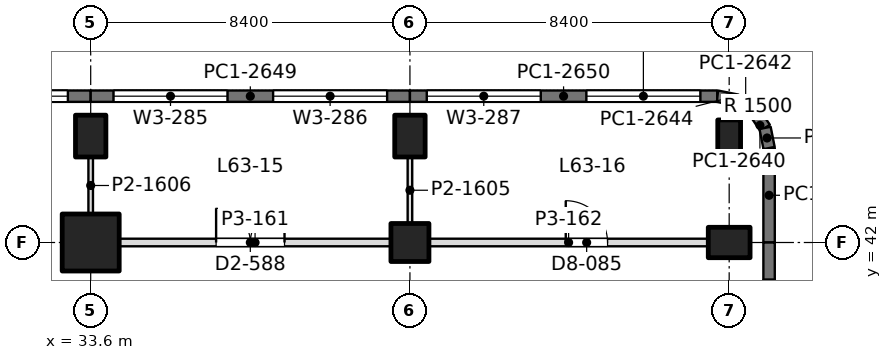
"""IFC4 building model, lengths in metres.
Left out: names, types, materials, properties, quantities, classifications, styles, units other than length and angle.
Written with IfcOpenShell. Run it as: python <this file> out.ifc"""

import sys

from ifc_helpers import new_model, si_unit, direction, frame, frame_2d, origin, origin_2d, place, context, subcontext, project, spatial, rectangle, extrude, element, fill, save


model = new_model("IFC4")
c1 = context("Model", 3, precision=1e-05, world=origin(), true_north=direction((0.0, 1.0)))
c2 = subcontext(c1, "Body", "Model", "MODEL_VIEW")
j1 = project(units=[si_unit("LENGTHUNIT", "METRE"), si_unit("PLANEANGLEUNIT", "RADIAN")], contexts=[c1])
p1 = place(None, origin())
s1 = spatial("IfcSite", under=j1, at=p1, CompositionType="ELEMENT")
p2 = place(p1, origin())
s2 = spatial("IfcBuilding", under=s1, at=p2, CompositionType="ELEMENT")
p3 = place(p2, frame((0.0, 0.0, 277.2)))
s3 = spatial("IfcBuildingStorey", under=s2, at=p3, CompositionType="ELEMENT", Elevation=277.2)
p4 = place(p3, frame((33.6, 42.0, 0.0), z_axis=(0.0, 0.0, 1.0), x_axis=(1.0, 0.0, 0.0)))
e1 = element("IfcColumn", 1, at=p4, inside=s3, PredefinedType="COLUMN", context=c2, shape_type="SweptSolid", body=[
    extrude(rectangle(XDim=1.5, YDim=1.5, at=origin_2d()), origin(), (0.0, 0.0, 1.0), 4.5),
])
p5 = place(p3, frame((33.6, 44.8, 0.0), z_axis=(0.0, 0.0, 1.0), x_axis=(1.0, 0.0, 0.0)))
e2 = element("IfcColumn", 2, at=p5, inside=s3, PredefinedType="COLUMN", context=c2, shape_type="SweptSolid", body=[
    extrude(rectangle(XDim=0.8, YDim=1.1, at=origin_2d()), origin(), (0.0, 0.0, 1.0), 4.5),
])
p6 = place(p3, frame((42.0, 42.0, 0.0), z_axis=(0.0, 0.0, 1.0), x_axis=(1.0, 0.0, 0.0)))
e3 = element("IfcColumn", 3, at=p6, inside=s3, PredefinedType="COLUMN", context=c2, shape_type="SweptSolid", body=[
    extrude(rectangle(XDim=1.0, YDim=1.0, at=origin_2d()), origin(), (0.0, 0.0, 1.0), 4.5),
])
for number, where, z_axis, x_axis in (
    (4, (42.0, 44.8, 0.0), (0.0, 0.0, 1.0), (1.0, 0.0, 0.0)),
    (5, (50.4, 42.0, 0.0), (0.0, 0.0, 1.0), (0.0, 1.0, 0.0)),
):
    element("IfcColumn", number, at=place(p3, frame(where, z_axis=z_axis, x_axis=x_axis)), inside=s3, PredefinedType="COLUMN", context=c2, shape_type="SweptSolid", body=[
        extrude(rectangle(XDim=0.8, YDim=1.1, at=origin_2d()), origin(), (0.0, 0.0, 1.0), 4.5),
    ])
p7 = place(p3, frame((50.4, 44.8, 0.0), z_axis=(0.0, 0.0, 1.0), x_axis=(1.0, 0.0, 0.0)))
e6 = element("IfcColumn", 6, at=p7, inside=s3, PredefinedType="COLUMN", context=c2, shape_type="SweptSolid", body=[
    extrude(rectangle(XDim=0.6, YDim=0.85, at=origin_2d()), origin(), (0.0, 0.0, 1.0), 4.5),
])
p8 = place(p3, frame((25.2, 45.85, 0.0), z_axis=(0.0, 0.0, 1.0), x_axis=(1.0, 0.0, 0.0)))
e7 = element("IfcWall", 7, at=p8, inside=s3, PredefinedType="SOLIDWALL", context=c2, shape_type="SweptSolid", body=[
    extrude(rectangle(XDim=8.4, YDim=0.3, at=frame_2d((4.2, 0.0))), origin(), (0.0, 0.0, 1.0), 4.3),
])
p9 = place(p8, frame((0.6, 0.0, 0.9)))
e8 = element("IfcOpeningElement", 8, at=p9, cuts=e7, PredefinedType="OPENING", context=c2, shape_type="SweptSolid", body=[
    extrude(rectangle(XDim=3.0, YDim=2.4, at=frame_2d((1.5, 1.2))), frame((0.0, 0.16, 0.0), z_axis=(0.0, -1.0, 0.0), x_axis=(1.0, 0.0, 0.0)), (0.0, 0.0, 1.0), 0.32),
])
p10 = place(p8, frame((4.8, 0.0, 0.9)))
e9 = element("IfcOpeningElement", 9, at=p10, cuts=e7, PredefinedType="OPENING", context=c2, shape_type="SweptSolid", body=[
    extrude(rectangle(XDim=3.0, YDim=2.4, at=frame_2d((1.5, 1.2))), frame((0.0, 0.16, 0.0), z_axis=(0.0, -1.0, 0.0), x_axis=(1.0, 0.0, 0.0)), (0.0, 0.0, 1.0), 0.32),
])
p11 = place(p3, frame((33.6, 45.85, 0.0), z_axis=(0.0, 0.0, 1.0), x_axis=(1.0, 0.0, 0.0)))
e10 = element("IfcWall", 10, at=p11, inside=s3, PredefinedType="SOLIDWALL", context=c2, shape_type="SweptSolid", body=[
    extrude(rectangle(XDim=8.4, YDim=0.3, at=frame_2d((4.2, 0.0))), origin(), (0.0, 0.0, 1.0), 4.3),
])
p12 = place(p11, frame((0.6, 0.0, 0.9)))
e11 = element("IfcOpeningElement", 11, at=p12, cuts=e10, PredefinedType="OPENING", context=c2, shape_type="SweptSolid", body=[
    extrude(rectangle(XDim=3.0, YDim=2.4, at=frame_2d((1.5, 1.2))), frame((0.0, 0.16, 0.0), z_axis=(0.0, -1.0, 0.0), x_axis=(1.0, 0.0, 0.0)), (0.0, 0.0, 1.0), 0.32),
])
p13 = place(p11, frame((4.8, 0.0, 0.9)))
e12 = element("IfcOpeningElement", 12, at=p13, cuts=e10, PredefinedType="OPENING", context=c2, shape_type="SweptSolid", body=[
    extrude(rectangle(XDim=3.0, YDim=2.4, at=frame_2d((1.5, 1.2))), frame((0.0, 0.16, 0.0), z_axis=(0.0, -1.0, 0.0), x_axis=(1.0, 0.0, 0.0)), (0.0, 0.0, 1.0), 0.32),
])
p14 = place(p3, frame((42.0, 45.85, 0.0), z_axis=(0.0, 0.0, 1.0), x_axis=(1.0, 0.0, 0.0)))
e13 = element("IfcWall", 13, at=p14, inside=s3, PredefinedType="SOLIDWALL", context=c2, shape_type="SweptSolid", body=[
    extrude(rectangle(XDim=8.085, YDim=0.3, at=frame_2d((4.042, 0.0))), origin(), (0.0, 0.0, 1.0), 4.3),
])
p15 = place(p14, frame((0.443, 0.0, 0.9)))
e14 = element("IfcOpeningElement", 14, at=p15, cuts=e13, PredefinedType="OPENING", context=c2, shape_type="SweptSolid", body=[
    extrude(rectangle(XDim=3.0, YDim=2.4, at=frame_2d((1.5, 1.2))), frame((0.0, 0.16, 0.0), z_axis=(0.0, -1.0, 0.0), x_axis=(1.0, 0.0, 0.0)), (0.0, 0.0, 1.0), 0.32),
])
p16 = place(p14, frame((4.643, 0.0, 0.9)))
e15 = element("IfcOpeningElement", 15, at=p16, cuts=e13, PredefinedType="OPENING", context=c2, shape_type="SweptSolid", body=[
    extrude(rectangle(XDim=3.0, YDim=2.4, at=frame_2d((1.5, 1.2))), frame((0.0, 0.16, 0.0), z_axis=(0.0, -1.0, 0.0), x_axis=(1.0, 0.0, 0.0)), (0.0, 0.0, 1.0), 0.32),
])
p17 = place(p3, frame((50.085, 45.85, 0.0), z_axis=(0.0, 0.0, 1.0), x_axis=(0.980702050465, -0.1955082817, 0.0)))
e16 = element("IfcWall", 16, at=p17, inside=s3, PredefinedType="SOLIDWALL", context=c2, shape_type="SweptSolid", body=[
    extrude(rectangle(XDim=0.541, YDim=0.3, at=frame_2d((0.271, 0.0))), origin(), (0.0, 0.0, 1.0), 4.3),
])
p18 = place(p3, frame((50.615, 45.744, 0.0), z_axis=(0.0, 0.0, 1.0), x_axis=(0.831692711774, -0.555236195849, 0.0)))
e17 = element("IfcWall", 17, at=p18, inside=s3, PredefinedType="SOLIDWALL", context=c2, shape_type="SweptSolid", body=[
    extrude(rectangle(XDim=0.525, YDim=0.3, at=frame_2d((0.263, 0.0))), origin(), (0.0, 0.0, 1.0), 4.3),
])
p19 = place(p3, frame((51.052, 45.453, 0.0), z_axis=(0.0, 0.0, 1.0), x_axis=(0.55534295404, -0.831621430339, 0.0)))
e18 = element("IfcWall", 18, at=p19, inside=s3, PredefinedType="SOLIDWALL", context=c2, shape_type="SweptSolid", body=[
    extrude(rectangle(XDim=0.526, YDim=0.3, at=frame_2d((0.263, 0.0))), origin(), (0.0, 0.0, 1.0), 4.3),
])
p20 = place(p3, frame((51.344, 45.015, 0.0), z_axis=(0.0, 0.0, 1.0), x_axis=(0.195073962632, -0.980788534345, 0.0)))
e19 = element("IfcWall", 19, at=p20, inside=s3, PredefinedType="SOLIDWALL", context=c2, shape_type="SweptSolid", body=[
    extrude(rectangle(XDim=0.541, YDim=0.3, at=frame_2d((0.271, 0.0))), origin(), (0.0, 0.0, 1.0), 4.3),
])
p21 = place(p3, frame((51.45, 44.485, 0.0), z_axis=(0.0, 0.0, 1.0), x_axis=(0.0, -1.0, 0.0)))
e20 = element("IfcWall", 20, at=p21, inside=s3, PredefinedType="SOLIDWALL", context=c2, shape_type="SweptSolid", body=[
    extrude(rectangle(XDim=2.485, YDim=0.3, at=frame_2d((1.243, 0.0))), origin(), (0.0, 0.0, 1.0), 4.3),
])
p22 = place(p3, frame((51.45, 42.0, 0.0), z_axis=(0.0, 0.0, 1.0), x_axis=(0.0, -1.0, 0.0)))
e21 = element("IfcWall", 21, at=p22, inside=s3, PredefinedType="SOLIDWALL", context=c2, shape_type="SweptSolid", body=[
    extrude(rectangle(XDim=4.35, YDim=0.3, at=frame_2d((2.175, 0.0))), origin(), (0.0, 0.0, 1.0), 4.3),
])
p23 = place(p22, frame((0.975, 0.0, 0.9)))
e22 = element("IfcOpeningElement", 22, at=p23, cuts=e21, PredefinedType="OPENING", context=c2, shape_type="SweptSolid", body=[
    extrude(rectangle(XDim=2.4, YDim=1.9, at=frame_2d((1.2, 0.95))), frame((0.0, 0.16, 0.0), z_axis=(0.0, -1.0, 0.0), x_axis=(1.0, 0.0, 0.0)), (0.0, 0.0, 1.0), 0.32),
])
p24 = place(p3, frame((34.349, 42.0, 0.0), z_axis=(0.0, 0.0, 1.0), x_axis=(1.0, 0.0, 0.0)))
e23 = element("IfcWall", 23, at=p24, inside=s3, PredefinedType="PARTITIONING", context=c2, shape_type="SweptSolid", body=[
    extrude(rectangle(XDim=7.152, YDim=0.2, at=frame_2d((3.576, 0.0))), origin(), (0.0, 0.0, 1.0), 3.292),
])
p25 = place(p24, frame((2.551, 0.0, 0.0)))
e24 = element("IfcOpeningElement", 24, at=p25, cuts=e23, PredefinedType="OPENING", context=c2, shape_type="SweptSolid", body=[
    extrude(rectangle(XDim=1.8, YDim=2.2, at=frame_2d((0.9, 1.1))), frame((0.0, 0.11, 0.0), z_axis=(0.0, -1.0, 0.0), x_axis=(1.0, 0.0, 0.0)), (0.0, 0.0, 1.0), 0.22),
])
p26 = place(p3, frame((42.499, 42.0, 0.0), z_axis=(0.0, 0.0, 1.0), x_axis=(1.0, 0.0, 0.0)))
e25 = element("IfcWall", 25, at=p26, inside=s3, PredefinedType="PARTITIONING", context=c2, shape_type="SweptSolid", body=[
    extrude(rectangle(XDim=7.352, YDim=0.2, at=frame_2d((3.676, 0.0))), origin(), (0.0, 0.0, 1.0), 3.292),
])
p27 = place(p26, frame((3.601, 0.0, 0.0)))
e26 = element("IfcOpeningElement", 26, at=p27, cuts=e25, PredefinedType="OPENING", context=c2, shape_type="SweptSolid", body=[
    extrude(rectangle(XDim=1.1, YDim=2.4, at=frame_2d((0.55, 1.2))), frame((0.0, 0.11, 0.0), z_axis=(0.0, -1.0, 0.0), x_axis=(1.0, 0.0, 0.0)), (0.0, 0.0, 1.0), 0.22),
])
p28 = place(p3, frame((33.6, 42.749, 0.0), z_axis=(0.0, 0.0, 1.0), x_axis=(0.0, 1.0, 0.0)))
e27 = element("IfcWall", 27, at=p28, inside=s3, PredefinedType="PARTITIONING", context=c2, shape_type="SweptSolid", body=[
    extrude(rectangle(XDim=1.502, YDim=0.12, at=frame_2d((0.751, 0.0))), origin(), (0.0, 0.0, 1.0), 3.292),
])
p29 = place(p3, frame((42.0, 42.499, 0.0), z_axis=(0.0, 0.0, 1.0), x_axis=(0.0, 1.0, 0.0)))
e28 = element("IfcWall", 28, at=p29, inside=s3, PredefinedType="PARTITIONING", context=c2, shape_type="SweptSolid", body=[
    extrude(rectangle(XDim=1.752, YDim=0.12, at=frame_2d((0.876, 0.0))), origin(), (0.0, 0.0, 1.0), 3.292),
])
p30 = place(p10, origin())
e29 = element("IfcWindow", 29, at=p30, inside=s3, PartitioningType="SINGLE_PANEL", PredefinedType="WINDOW", context=c2, shape_type="SweptSolid", body=[
    extrude(rectangle(XDim=3.0, YDim=2.4, at=frame_2d((1.5, 1.2))), frame((0.0, 0.03, 0.0), z_axis=(0.0, -1.0, 0.0), x_axis=(1.0, 0.0, 0.0)), (0.0, 0.0, 1.0), 0.06),
])
fill(e9, e29)
p31 = place(p12, origin())
e30 = element("IfcWindow", 30, at=p31, inside=s3, PartitioningType="SINGLE_PANEL", PredefinedType="WINDOW", context=c2, shape_type="SweptSolid", body=[
    extrude(rectangle(XDim=3.0, YDim=2.4, at=frame_2d((1.5, 1.2))), frame((0.0, 0.03, 0.0), z_axis=(0.0, -1.0, 0.0), x_axis=(1.0, 0.0, 0.0)), (0.0, 0.0, 1.0), 0.06),
])
fill(e11, e30)
p32 = place(p13, origin())
e31 = element("IfcWindow", 31, at=p32, inside=s3, PartitioningType="SINGLE_PANEL", PredefinedType="WINDOW", context=c2, shape_type="SweptSolid", body=[
    extrude(rectangle(XDim=3.0, YDim=2.4, at=frame_2d((1.5, 1.2))), frame((0.0, 0.03, 0.0), z_axis=(0.0, -1.0, 0.0), x_axis=(1.0, 0.0, 0.0)), (0.0, 0.0, 1.0), 0.06),
])
fill(e12, e31)
p33 = place(p15, origin())
e32 = element("IfcWindow", 32, at=p33, inside=s3, PartitioningType="SINGLE_PANEL", PredefinedType="WINDOW", context=c2, shape_type="SweptSolid", body=[
    extrude(rectangle(XDim=3.0, YDim=2.4, at=frame_2d((1.5, 1.2))), frame((0.0, 0.03, 0.0), z_axis=(0.0, -1.0, 0.0), x_axis=(1.0, 0.0, 0.0)), (0.0, 0.0, 1.0), 0.06),
])
fill(e14, e32)
p34 = place(p16, origin())
e33 = element("IfcWindow", 33, at=p34, inside=s3, PartitioningType="SINGLE_PANEL", PredefinedType="WINDOW", context=c2, shape_type="SweptSolid", body=[
    extrude(rectangle(XDim=3.0, YDim=2.4, at=frame_2d((1.5, 1.2))), frame((0.0, 0.03, 0.0), z_axis=(0.0, -1.0, 0.0), x_axis=(1.0, 0.0, 0.0)), (0.0, 0.0, 1.0), 0.06),
])
fill(e15, e33)
p35 = place(p23, origin())
e34 = element("IfcWindow", 34, at=p35, inside=s3, PartitioningType="SINGLE_PANEL", PredefinedType="WINDOW", context=c2, shape_type="SweptSolid", body=[
    extrude(rectangle(XDim=2.4, YDim=1.9, at=frame_2d((1.2, 0.95))), frame((0.0, 0.03, 0.0), z_axis=(0.0, -1.0, 0.0), x_axis=(1.0, 0.0, 0.0)), (0.0, 0.0, 1.0), 0.06),
])
fill(e22, e34)
p36 = place(p25, origin())
e35 = element("IfcDoor", 35, at=p36, inside=s3, OperationType="DOUBLE_DOOR_SINGLE_SWING", PredefinedType="DOOR", context=c2, shape_type="SweptSolid", body=[
    extrude(rectangle(XDim=1.8, YDim=2.2, at=frame_2d((0.9, 1.1))), frame((0.0, 0.025, 0.0), z_axis=(0.0, -1.0, 0.0), x_axis=(1.0, 0.0, 0.0)), (0.0, 0.0, 1.0), 0.05),
])
fill(e24, e35)
p37 = place(p27, origin())
e36 = element("IfcDoor", 36, at=p37, inside=s3, OperationType="SINGLE_SWING_LEFT", PredefinedType="DOOR", context=c2, shape_type="SweptSolid", body=[
    extrude(rectangle(XDim=1.1, YDim=2.4, at=frame_2d((0.55, 1.2))), frame((0.0, 0.025, 0.0), z_axis=(0.0, -1.0, 0.0), x_axis=(1.0, 0.0, 0.0)), (0.0, 0.0, 1.0), 0.05),
])
fill(e26, e36)
save(model, sys.argv[1])
